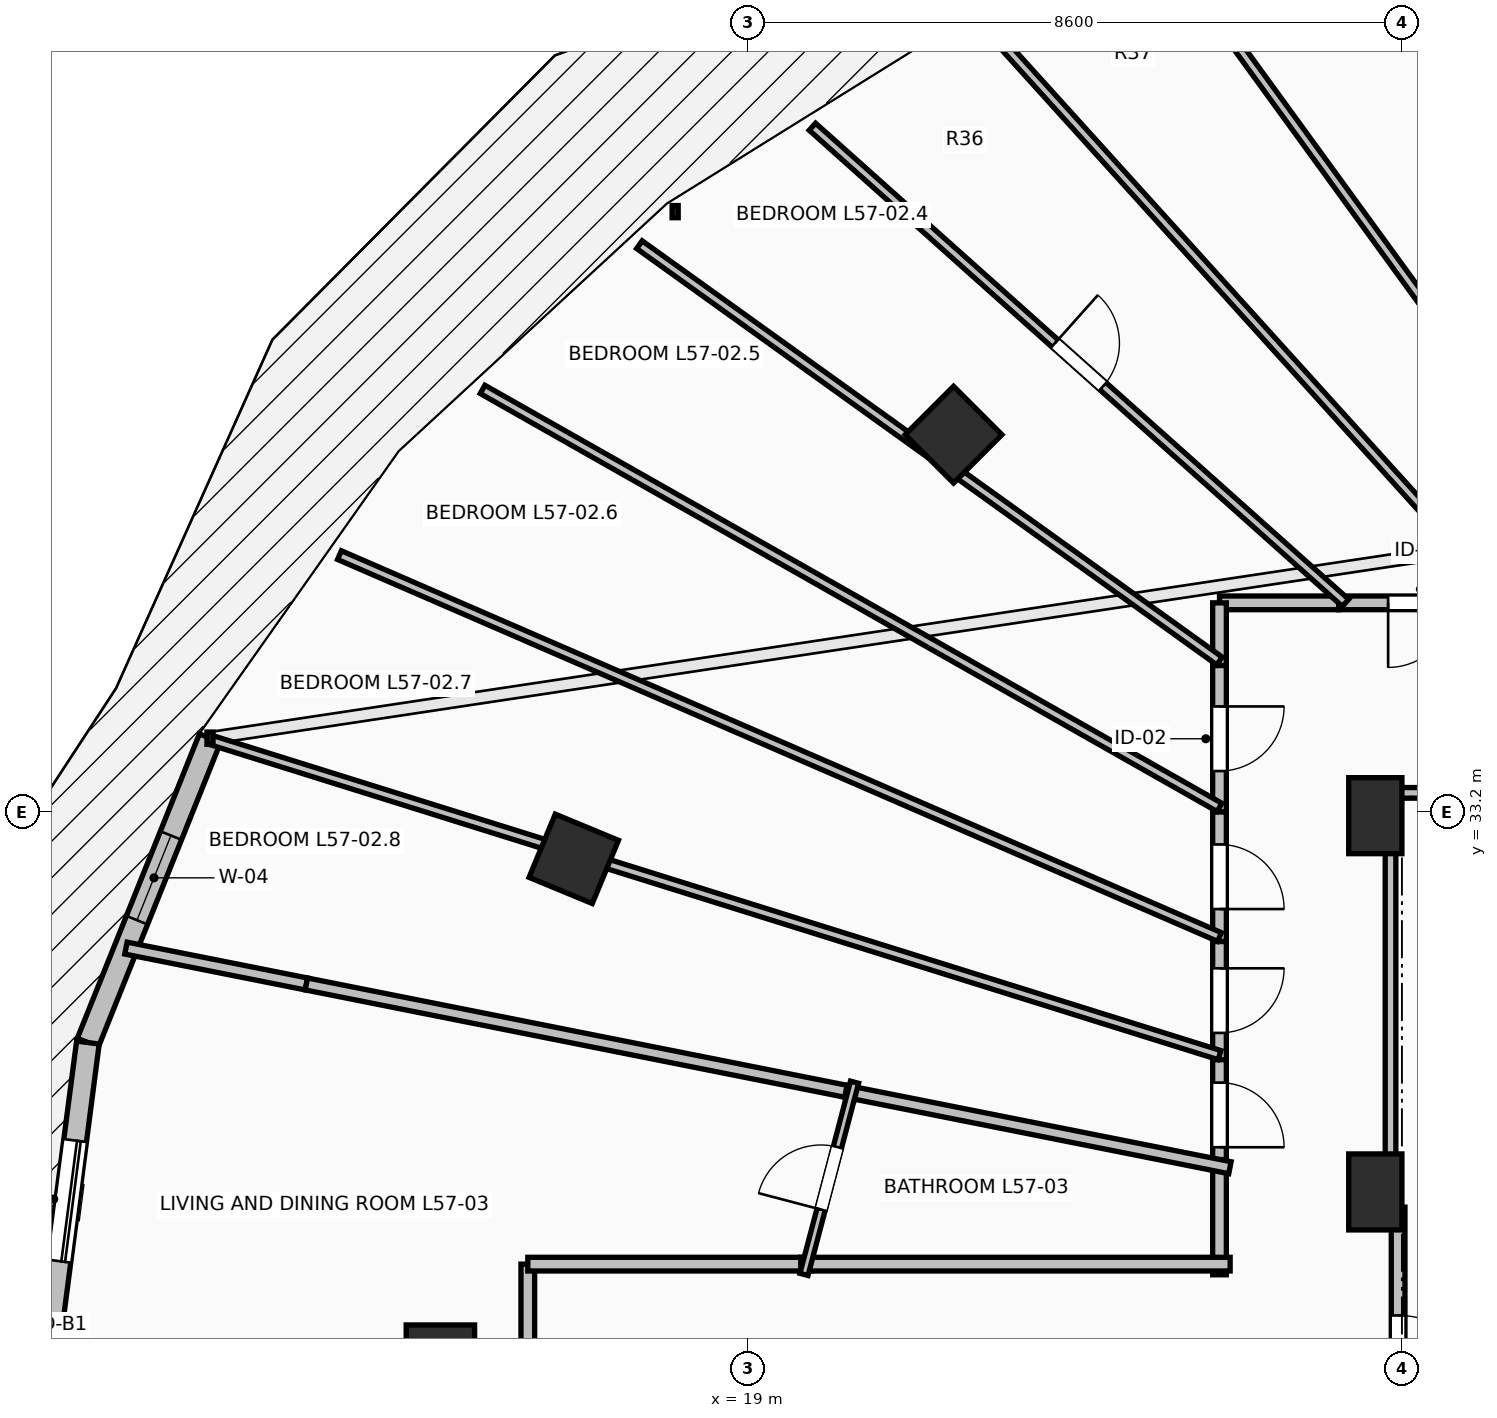
"""IFC4 building model, lengths in metres.
Left out: names, types, materials, properties, quantities, classifications, styles, units other than length and angle.
Written with IfcOpenShell. Run it as: python <this file> out.ifc"""

import sys

from ifc_helpers import new_model, si_unit, direction, frame, frame_2d, origin, origin_2d, place, context, subcontext, project, spatial, rectangle, extrude, element, fill, save


model = new_model("IFC4")
c1 = context("Model", 3, precision=1e-05, world=origin(), true_north=direction((0.0, 1.0)))
c2 = subcontext(c1, "Body", "Model", "MODEL_VIEW")
j1 = project(units=[si_unit("LENGTHUNIT", "METRE"), si_unit("PLANEANGLEUNIT", "RADIAN")], contexts=[c1])
p1 = place(None, origin())
s1 = spatial("IfcSite", under=j1, at=p1, CompositionType="ELEMENT")
p2 = place(p1, origin())
s2 = spatial("IfcBuilding", under=s1, at=p2, CompositionType="ELEMENT")
p3 = place(p2, frame((0.0, 0.0, 210.75)))
s3 = spatial("IfcBuildingStorey", under=s2, at=p3, CompositionType="ELEMENT", Elevation=210.75)
for number, where, z_axis, x_axis in (
    (1, (21.701, 38.162, 0.0), (0.0, 0.0, 1.0), (-0.707, 0.707, 0.0)),
    (2, (16.705, 32.582, 0.0), (0.0, 0.0, 1.0), (-0.924, 0.383, 0.0)),
    (3, (14.95, 26.0, 0.0), (0.0, 0.0, 1.0), (-1.0, 0.0, 0.0)),
):
    element("IfcColumn", number, at=place(p3, frame(where, z_axis=z_axis, x_axis=x_axis)), inside=s3, PredefinedType="COLUMN", context=c2, shape_type="SweptSolid", body=[
        extrude(rectangle(XDim=0.9, YDim=0.9, at=origin_2d()), origin(), (0.0, 0.0, 1.0), 3.55),
    ])
for number, where, z_axis, x_axis in (
    (4, (27.25, 28.2, 0.0), (0.0, 0.0, 1.0), (1.0, 0.0, 0.0)),
    (5, (27.25, 33.15, 0.0), (0.0, 0.0, 1.0), (1.0, 0.0, 0.0)),
):
    element("IfcColumn", number, at=place(p3, frame(where, z_axis=z_axis, x_axis=x_axis)), inside=s3, PredefinedType="PILASTER", context=c2, shape_type="SweptSolid", body=[
        extrude(rectangle(XDim=0.7, YDim=1.0, at=origin_2d()), origin(), (0.0, 0.0, 1.0), 3.55),
    ])
p4 = place(p3, frame((11.919, 34.17, 0.0), z_axis=(0.0, 0.0, 1.0), x_axis=(-0.372268409848, -0.928125116043, 0.0)))
e6 = element("IfcWall", 6, at=p4, inside=s3, PredefinedType="STANDARD", context=c2, shape_type="SweptSolid", body=[
    extrude(rectangle(XDim=4.315, YDim=0.3, at=frame_2d((2.158, 0.0))), origin(), (0.0, 0.0, 1.0), 3.29),
])
p5 = place(p4, frame((1.38, 0.0, 0.85)))
e7 = element("IfcOpeningElement", 7, at=p5, cuts=e6, PredefinedType="OPENING", context=c2, shape_type="SweptSolid", body=[
    extrude(rectangle(XDim=1.2, YDim=1.95, at=frame_2d((0.6, 0.975))), frame((0.0, 0.165, 0.0), z_axis=(0.0, -1.0, 0.0), x_axis=(1.0, 0.0, 0.0)), (0.0, 0.0, 1.0), 0.33),
])
p6 = place(p3, frame((10.312, 30.165, 0.0), z_axis=(0.0, 0.0, 1.0), x_axis=(-0.129147853268, -0.991625348605, 0.0)))
e8 = element("IfcWall", 8, at=p6, inside=s3, PredefinedType="STANDARD", context=c2, shape_type="SweptSolid", body=[
    extrude(rectangle(XDim=4.2, YDim=0.3, at=frame_2d((2.1, 0.0))), origin(), (0.0, 0.0, 1.0), 3.29),
])
p7 = place(p6, frame((1.3, 0.0, 0.0)))
e9 = element("IfcOpeningElement", 9, at=p7, cuts=e8, PredefinedType="OPENING", context=c2, shape_type="SweptSolid", body=[
    extrude(rectangle(XDim=1.6, YDim=2.3, at=frame_2d((0.8, 1.15))), frame((0.0, 0.165, 0.0), z_axis=(0.0, -1.0, 0.0), x_axis=(1.0, 0.0, 0.0)), (0.0, 0.0, 1.0), 0.33),
])
p8 = place(p3, frame((27.55, 28.0, 0.0), z_axis=(0.0, 0.0, 1.0), x_axis=(0.0, -1.0, 0.0)))
e10 = element("IfcWall", 10, at=p8, inside=s3, PredefinedType="PARTITIONING", context=c2, shape_type="SweptSolid", body=[
    extrude(rectangle(XDim=4.05, YDim=0.18, at=frame_2d((2.025, 0.0))), origin(), (0.0, 0.0, 1.0), 3.29),
])
p9 = place(p8, frame((1.425, 0.0, 0.0)))
e11 = element("IfcOpeningElement", 11, at=p9, cuts=e10, PredefinedType="OPENING", context=c2, shape_type="SweptSolid", body=[
    extrude(rectangle(XDim=1.2, YDim=2.15, at=frame_2d((0.6, 1.075))), frame((0.0, 0.105, 0.0), z_axis=(0.0, -1.0, 0.0), x_axis=(1.0, 0.0, 0.0)), (0.0, 0.0, 1.0), 0.21),
])
p10 = place(p3, frame((28.919, 35.95, 0.0), z_axis=(0.0, 0.0, 1.0), x_axis=(-1.0, 0.0, 0.0)))
e12 = element("IfcWall", 12, at=p10, inside=s3, PredefinedType="PARTITIONING", context=c2, shape_type="SweptSolid", body=[
    extrude(rectangle(XDim=2.151, YDim=0.18, at=frame_2d((1.075, 0.0))), origin(), (0.0, 0.0, 1.0), 2.482),
])
p11 = place(p10, frame((0.65, 0.0, 0.0)))
e13 = element("IfcOpeningElement", 13, at=p11, cuts=e12, PredefinedType="OPENING", context=c2, shape_type="SweptSolid", body=[
    extrude(rectangle(XDim=0.85, YDim=2.1, at=frame_2d((0.425, 1.05))), frame((0.0, 0.105, 0.0), z_axis=(0.0, -1.0, 0.0), x_axis=(1.0, 0.0, 0.0)), (0.0, 0.0, 1.0), 0.21),
])
p12 = place(p3, frame((26.768, 35.95, 0.0), z_axis=(0.0, 0.0, 1.0), x_axis=(-1.0, 0.0, 0.0)))
e14 = element("IfcWall", 14, at=p12, inside=s3, PredefinedType="PARTITIONING", context=c2, shape_type="SweptSolid", body=[
    extrude(rectangle(XDim=1.568, YDim=0.18, at=frame_2d((0.784, 0.0))), origin(), (0.0, 0.0, 1.0), 3.29),
])
p13 = place(p3, frame((25.2, 35.95, 0.0), z_axis=(0.0, 0.0, 1.0), x_axis=(0.0, -1.0, 0.0)))
e15 = element("IfcWall", 15, at=p13, inside=s3, PredefinedType="PARTITIONING", context=c2, shape_type="SweptSolid", body=[
    extrude(rectangle(XDim=0.825, YDim=0.18, at=frame_2d((0.413, 0.0))), origin(), (0.0, 0.0, 1.0), 2.482),
])
p14 = place(p3, frame((25.2, 35.125, 0.0), z_axis=(0.0, 0.0, 1.0), x_axis=(0.0, -1.0, 0.0)))
e16 = element("IfcWall", 16, at=p14, inside=s3, PredefinedType="PARTITIONING", context=c2, shape_type="SweptSolid", body=[
    extrude(rectangle(XDim=1.926, YDim=0.18, at=frame_2d((0.963, 0.0))), origin(), (0.0, 0.0, 1.0), 2.482),
])
p15 = place(p14, frame((0.538, 0.0, 0.0)))
e17 = element("IfcOpeningElement", 17, at=p15, cuts=e16, PredefinedType="OPENING", context=c2, shape_type="SweptSolid", body=[
    extrude(rectangle(XDim=0.85, YDim=2.1, at=frame_2d((0.425, 1.05))), frame((0.0, 0.105, 0.0), z_axis=(0.0, -1.0, 0.0), x_axis=(1.0, 0.0, 0.0)), (0.0, 0.0, 1.0), 0.21),
])
p16 = place(p3, frame((25.2, 33.199, 0.0), z_axis=(0.0, 0.0, 1.0), x_axis=(0.0, -1.0, 0.0)))
e18 = element("IfcWall", 18, at=p16, inside=s3, PredefinedType="PARTITIONING", context=c2, shape_type="SweptSolid", body=[
    extrude(rectangle(XDim=1.705, YDim=0.18, at=frame_2d((0.853, 0.0))), origin(), (0.0, 0.0, 1.0), 2.979),
])
p17 = place(p16, frame((0.427, 0.0, 0.0)))
e19 = element("IfcOpeningElement", 19, at=p17, cuts=e18, PredefinedType="OPENING", context=c2, shape_type="SweptSolid", body=[
    extrude(rectangle(XDim=0.85, YDim=2.1, at=frame_2d((0.425, 1.05))), frame((0.0, 0.105, 0.0), z_axis=(0.0, -1.0, 0.0), x_axis=(1.0, 0.0, 0.0)), (0.0, 0.0, 1.0), 0.21),
])
p18 = place(p3, frame((25.2, 31.494, 0.0), z_axis=(0.0, 0.0, 1.0), x_axis=(0.0, -1.0, 0.0)))
e20 = element("IfcWall", 20, at=p18, inside=s3, PredefinedType="PARTITIONING", context=c2, shape_type="SweptSolid", body=[
    extrude(rectangle(XDim=1.554, YDim=0.18, at=frame_2d((0.777, 0.0))), origin(), (0.0, 0.0, 1.0), 3.29),
])
p19 = place(p18, frame((0.352, 0.0, 0.0)))
e21 = element("IfcOpeningElement", 21, at=p19, cuts=e20, PredefinedType="OPENING", context=c2, shape_type="SweptSolid", body=[
    extrude(rectangle(XDim=0.85, YDim=2.1, at=frame_2d((0.425, 1.05))), frame((0.0, 0.105, 0.0), z_axis=(0.0, -1.0, 0.0), x_axis=(1.0, 0.0, 0.0)), (0.0, 0.0, 1.0), 0.21),
])
p20 = place(p3, frame((25.2, 29.94, 0.0), z_axis=(0.0, 0.0, 1.0), x_axis=(0.0, -1.0, 0.0)))
e22 = element("IfcWall", 22, at=p20, inside=s3, PredefinedType="PARTITIONING", context=c2, shape_type="SweptSolid", body=[
    extrude(rectangle(XDim=1.454, YDim=0.18, at=frame_2d((0.727, 0.0))), origin(), (0.0, 0.0, 1.0), 2.482),
])
p21 = place(p20, frame((0.302, 0.0, 0.0)))
e23 = element("IfcOpeningElement", 23, at=p21, cuts=e22, PredefinedType="OPENING", context=c2, shape_type="SweptSolid", body=[
    extrude(rectangle(XDim=0.85, YDim=2.1, at=frame_2d((0.425, 1.05))), frame((0.0, 0.105, 0.0), z_axis=(0.0, -1.0, 0.0), x_axis=(1.0, 0.0, 0.0)), (0.0, 0.0, 1.0), 0.21),
])
p22 = place(p3, frame((16.1, 27.25, 0.0), z_axis=(0.0, 0.0, 1.0), x_axis=(0.0, -1.0, 0.0)))
e24 = element("IfcWall", 24, at=p22, inside=s3, PredefinedType="PARTITIONING", context=c2, shape_type="SweptSolid", body=[
    extrude(rectangle(XDim=2.7, YDim=0.18, at=frame_2d((1.35, 0.0))), origin(), (0.0, 0.0, 1.0), 2.482),
])
p23 = place(p3, frame((19.831, 27.25, 0.0), z_axis=(0.0, 0.0, 1.0), x_axis=(-1.0, 0.0, 0.0)))
e25 = element("IfcWall", 25, at=p23, inside=s3, PredefinedType="PARTITIONING", context=c2, shape_type="SweptSolid", body=[
    extrude(rectangle(XDim=3.731, YDim=0.18, at=frame_2d((1.865, 0.0))), origin(), (0.0, 0.0, 1.0), 2.936),
])
p24 = place(p3, frame((25.2, 28.626, 0.0), z_axis=(0.0, 0.0, 1.0), x_axis=(0.0, -1.0, 0.0)))
e26 = element("IfcWall", 26, at=p24, inside=s3, PredefinedType="PARTITIONING", context=c2, shape_type="SweptSolid", body=[
    extrude(rectangle(XDim=1.516, YDim=0.18, at=frame_2d((0.758, 0.0))), origin(), (0.0, 0.0, 1.0), 2.482),
])
p25 = place(p3, frame((25.34, 27.25, 0.0), z_axis=(0.0, 0.0, 1.0), x_axis=(-1.0, 0.0, 0.0)))
e27 = element("IfcWall", 27, at=p25, inside=s3, PredefinedType="PARTITIONING", context=c2, shape_type="SweptSolid", body=[
    extrude(rectangle(XDim=5.649, YDim=0.18, at=frame_2d((2.825, 0.0))), origin(), (0.0, 0.0, 1.0), 2.482),
])
p26 = place(p3, frame((27.562, 44.133, 0.0), z_axis=(0.0, 0.0, 1.0), x_axis=(0.498920898859, -0.866647527361, 0.0)))
e28 = element("IfcWall", 28, at=p26, inside=s3, PredefinedType="PARTITIONING", context=c2, shape_type="SweptSolid", body=[
    extrude(rectangle(XDim=9.442, YDim=0.125, at=frame_2d((4.721, 0.0))), origin(), (0.0, 0.0, 1.0), 2.482),
])
p27 = place(p26, frame((4.271, 0.0, 0.0)))
e29 = element("IfcOpeningElement", 29, at=p27, cuts=e28, PredefinedType="OPENING", context=c2, shape_type="SweptSolid", body=[
    extrude(rectangle(XDim=0.9, YDim=2.1, at=frame_2d((0.45, 1.05))), frame((0.0, 0.077, 0.0), z_axis=(0.0, -1.0, 0.0), x_axis=(1.0, 0.0, 0.0)), (0.0, 0.0, 1.0), 0.155),
])
p28 = place(p3, frame((24.46, 44.617, 0.0), z_axis=(0.0, 0.0, 1.0), x_axis=(0.588154087929, -0.808748891098, 0.0)))
e30 = element("IfcWall", 30, at=p28, inside=s3, PredefinedType="PARTITIONING", context=c2, shape_type="SweptSolid", body=[
    extrude(rectangle(XDim=10.717, YDim=0.125, at=frame_2d((5.358, 0.0))), origin(), (0.0, 0.0, 1.0), 2.482),
])
p29 = place(p3, frame((22.077, 43.603, 0.0), z_axis=(0.0, 0.0, 1.0), x_axis=(0.670853853748, -0.741589581177, 0.0)))
e31 = element("IfcWall", 31, at=p29, inside=s3, PredefinedType="PARTITIONING", context=c2, shape_type="SweptSolid", body=[
    extrude(rectangle(XDim=10.32, YDim=0.125, at=frame_2d((5.16, 0.0))), origin(), (0.0, 0.0, 1.0), 2.482),
])
p30 = place(p3, frame((19.844, 42.214, 0.0), z_axis=(0.0, 0.0, 1.0), x_axis=(0.745845988041, -0.666118429502, 0.0)))
e32 = element("IfcWall", 32, at=p30, inside=s3, PredefinedType="PARTITIONING", context=c2, shape_type="SweptSolid", body=[
    extrude(rectangle(XDim=9.404, YDim=0.125, at=frame_2d((4.702, 0.0))), origin(), (0.0, 0.0, 1.0), 2.824),
])
p31 = place(p30, frame((4.277, 0.0, 0.0)))
e33 = element("IfcOpeningElement", 33, at=p31, cuts=e32, PredefinedType="OPENING", context=c2, shape_type="SweptSolid", body=[
    extrude(rectangle(XDim=0.85, YDim=2.1, at=frame_2d((0.425, 1.05))), frame((0.0, 0.077, 0.0), z_axis=(0.0, -1.0, 0.0), x_axis=(1.0, 0.0, 0.0)), (0.0, 0.0, 1.0), 0.155),
])
p32 = place(p3, frame((17.568, 40.662, 0.0), z_axis=(0.0, 0.0, 1.0), x_axis=(0.812435479674, -0.583051105279, 0.0)))
e34 = element("IfcWall", 34, at=p32, inside=s3, PredefinedType="PARTITIONING", context=c2, shape_type="SweptSolid", body=[
    extrude(rectangle(XDim=9.394, YDim=0.125, at=frame_2d((4.697, 0.0))), origin(), (0.0, 0.0, 1.0), 2.482),
])
p33 = place(p3, frame((15.505, 38.758, 0.0), z_axis=(0.0, 0.0, 1.0), x_axis=(0.86982387552, -0.49336236741, 0.0)))
e35 = element("IfcWall", 35, at=p33, inside=s3, PredefinedType="PARTITIONING", context=c2, shape_type="SweptSolid", body=[
    extrude(rectangle(XDim=11.146, YDim=0.125, at=frame_2d((5.573, 0.0))), origin(), (0.0, 0.0, 1.0), 2.824),
])
p34 = place(p3, frame((13.622, 36.578, 0.0), z_axis=(0.0, 0.0, 1.0), x_axis=(0.917357672996, -0.398063939331, 0.0)))
e36 = element("IfcWall", 36, at=p34, inside=s3, PredefinedType="PARTITIONING", context=c2, shape_type="SweptSolid", body=[
    extrude(rectangle(XDim=12.621, YDim=0.125, at=frame_2d((6.311, 0.0))), origin(), (0.0, 0.0, 1.0), 2.824),
])
p35 = place(p3, frame((11.911, 34.152, 0.0), z_axis=(0.0, 0.0, 1.0), x_axis=(0.954494953812, -0.298227066422, 0.0)))
e37 = element("IfcWall", 37, at=p35, inside=s3, PredefinedType="PARTITIONING", context=c2, shape_type="SweptSolid", body=[
    extrude(rectangle(XDim=13.923, YDim=0.125, at=frame_2d((6.961, 0.0))), origin(), (0.0, 0.0, 1.0), 2.482),
])
p36 = place(p3, frame((10.813, 31.408, 0.0), z_axis=(0.0, 0.0, 1.0), x_axis=(0.980808893275, -0.194971574527, 0.0)))
e38 = element("IfcWall", 38, at=p36, inside=s3, PredefinedType="PARTITIONING", context=c2, shape_type="SweptSolid", body=[
    extrude(rectangle(XDim=2.42, YDim=0.16, at=frame_2d((1.21, 0.0))), origin(), (0.0, 0.0, 1.0), 3.29),
])
p37 = place(p3, frame((13.187, 30.936, 0.0), z_axis=(0.0, 0.0, 1.0), x_axis=(0.980790143568, -0.195065871645, 0.0)))
e39 = element("IfcWall", 39, at=p37, inside=s3, PredefinedType="PARTITIONING", context=c2, shape_type="SweptSolid", body=[
    extrude(rectangle(XDim=7.377, YDim=0.16, at=frame_2d((3.688, 0.0))), origin(), (0.0, 0.0, 1.0), 2.824),
])
p38 = place(p3, frame((20.285, 29.524, 0.0), z_axis=(0.0, 0.0, 1.0), x_axis=(0.980782472544, -0.195104437547, 0.0)))
e40 = element("IfcWall", 40, at=p38, inside=s3, PredefinedType="PARTITIONING", context=c2, shape_type="SweptSolid", body=[
    extrude(rectangle(XDim=5.152, YDim=0.16, at=frame_2d((2.576, 0.0))), origin(), (0.0, 0.0, 1.0), 2.936),
])
p39 = place(p3, frame((19.733, 27.115, 0.0), z_axis=(0.0, 0.0, 1.0), x_axis=(0.254424362052, 0.967092676011, 0.0)))
e41 = element("IfcWall", 41, at=p39, inside=s3, PredefinedType="PARTITIONING", context=c2, shape_type="SweptSolid", body=[
    extrude(rectangle(XDim=2.615, YDim=0.11, at=frame_2d((1.307, 0.0))), origin(), (0.0, 0.0, 1.0), 2.482),
])
p40 = place(p39, frame((0.882, 0.0, 0.0)))
e42 = element("IfcOpeningElement", 42, at=p40, cuts=e41, PredefinedType="OPENING", context=c2, shape_type="SweptSolid", body=[
    extrude(rectangle(XDim=0.85, YDim=2.1, at=frame_2d((0.425, 1.05))), frame((0.0, 0.07, 0.0), z_axis=(0.0, -1.0, 0.0), x_axis=(1.0, 0.0, 0.0)), (0.0, 0.0, 1.0), 0.14),
])
p41 = place(p3, frame((28.894, 33.45, 0.0), z_axis=(0.0, 0.0, 1.0), x_axis=(-1.0, 0.0, 0.0)))
e43 = element("IfcWall", 43, at=p41, inside=s3, PredefinedType="PARTITIONING", context=c2, shape_type="SweptSolid", body=[
    extrude(rectangle(XDim=1.444, YDim=0.14, at=frame_2d((0.722, 0.0))), origin(), (0.0, 0.0, 1.0), 2.482),
])
p42 = place(p3, frame((27.45, 33.45, 0.0), z_axis=(0.0, 0.0, 1.0), x_axis=(0.0, -1.0, 0.0)))
e44 = element("IfcWall", 44, at=p42, inside=s3, PredefinedType="PARTITIONING", context=c2, shape_type="SweptSolid", body=[
    extrude(rectangle(XDim=5.254, YDim=0.14, at=frame_2d((2.627, 0.0))), origin(), (0.0, 0.0, 1.0), 2.482),
])
p43 = place(p7, origin())
e45 = element("IfcDoor", 45, at=p43, inside=s3, OperationType="SLIDING_TO_LEFT", PredefinedType="DOOR", context=c2, shape_type="SweptSolid", body=[
    extrude(rectangle(XDim=1.6, YDim=2.3, at=frame_2d((0.8, 1.15))), frame((0.0, 0.025, 0.0), z_axis=(0.0, -1.0, 0.0), x_axis=(1.0, 0.0, 0.0)), (0.0, 0.0, 1.0), 0.05),
])
fill(e9, e45)
p44 = place(p5, origin())
e46 = element("IfcWindow", 46, at=p44, inside=s3, PartitioningType="SINGLE_PANEL", PredefinedType="WINDOW", context=c2, shape_type="SweptSolid", body=[
    extrude(rectangle(XDim=1.2, YDim=1.95, at=frame_2d((0.6, 0.975))), frame((0.0, 0.03, 0.0), z_axis=(0.0, -1.0, 0.0), x_axis=(1.0, 0.0, 0.0)), (0.0, 0.0, 1.0), 0.06),
])
fill(e7, e46)
p45 = place(p9, origin())
e47 = element("IfcDoor", 47, at=p45, inside=s3, OperationType="SINGLE_SWING_RIGHT", PredefinedType="DOOR", context=c2, shape_type="SweptSolid", body=[
    extrude(rectangle(XDim=1.2, YDim=2.15, at=frame_2d((0.6, 1.075))), frame((0.0, 0.025, 0.0), z_axis=(0.0, -1.0, 0.0), x_axis=(1.0, 0.0, 0.0)), (0.0, 0.0, 1.0), 0.05),
])
fill(e11, e47)
p46 = place(p40, origin())
e48 = element("IfcDoor", 48, at=p46, inside=s3, OperationType="SINGLE_SWING_LEFT", PredefinedType="DOOR", context=c2, shape_type="SweptSolid", body=[
    extrude(rectangle(XDim=0.85, YDim=2.1, at=frame_2d((0.425, 1.05))), frame((0.0, 0.025, 0.0), z_axis=(0.0, -1.0, 0.0), x_axis=(1.0, 0.0, 0.0)), (0.0, 0.0, 1.0), 0.05),
])
fill(e42, e48)
p47 = place(p11, origin())
e49 = element("IfcDoor", 49, at=p47, inside=s3, OperationType="SINGLE_SWING_RIGHT", PredefinedType="DOOR", context=c2, shape_type="SweptSolid", body=[
    extrude(rectangle(XDim=0.85, YDim=2.1, at=frame_2d((0.425, 1.05))), frame((0.0, 0.025, 0.0), z_axis=(0.0, -1.0, 0.0), x_axis=(1.0, 0.0, 0.0)), (0.0, 0.0, 1.0), 0.05),
])
fill(e13, e49)
p48 = place(p15, origin())
e50 = element("IfcDoor", 50, at=p48, inside=s3, OperationType="SINGLE_SWING_LEFT", PredefinedType="DOOR", context=c2, shape_type="SweptSolid", body=[
    extrude(rectangle(XDim=0.85, YDim=2.1, at=frame_2d((0.425, 1.05))), frame((0.0, 0.025, 0.0), z_axis=(0.0, -1.0, 0.0), x_axis=(1.0, 0.0, 0.0)), (0.0, 0.0, 1.0), 0.05),
])
fill(e17, e50)
p49 = place(p17, origin())
e51 = element("IfcDoor", 51, at=p49, inside=s3, OperationType="SINGLE_SWING_RIGHT", PredefinedType="DOOR", context=c2, shape_type="SweptSolid", body=[
    extrude(rectangle(XDim=0.85, YDim=2.1, at=frame_2d((0.425, 1.05))), frame((0.0, 0.025, 0.0), z_axis=(0.0, -1.0, 0.0), x_axis=(1.0, 0.0, 0.0)), (0.0, 0.0, 1.0), 0.05),
])
fill(e19, e51)
p50 = place(p19, origin())
e52 = element("IfcDoor", 52, at=p50, inside=s3, OperationType="SINGLE_SWING_LEFT", PredefinedType="DOOR", context=c2, shape_type="SweptSolid", body=[
    extrude(rectangle(XDim=0.85, YDim=2.1, at=frame_2d((0.425, 1.05))), frame((0.0, 0.025, 0.0), z_axis=(0.0, -1.0, 0.0), x_axis=(1.0, 0.0, 0.0)), (0.0, 0.0, 1.0), 0.05),
])
fill(e21, e52)
p51 = place(p21, origin())
e53 = element("IfcDoor", 53, at=p51, inside=s3, OperationType="SINGLE_SWING_RIGHT", PredefinedType="DOOR", context=c2, shape_type="SweptSolid", body=[
    extrude(rectangle(XDim=0.85, YDim=2.1, at=frame_2d((0.425, 1.05))), frame((0.0, 0.025, 0.0), z_axis=(0.0, -1.0, 0.0), x_axis=(1.0, 0.0, 0.0)), (0.0, 0.0, 1.0), 0.05),
])
fill(e23, e53)
p52 = place(p31, origin())
e54 = element("IfcDoor", 54, at=p52, inside=s3, OperationType="SINGLE_SWING_LEFT", PredefinedType="DOOR", context=c2, shape_type="SweptSolid", body=[
    extrude(rectangle(XDim=0.85, YDim=2.1, at=frame_2d((0.425, 1.05))), frame((0.0, 0.025, 0.0), z_axis=(0.0, -1.0, 0.0), x_axis=(1.0, 0.0, 0.0)), (0.0, 0.0, 1.0), 0.05),
])
fill(e33, e54)
save(model, sys.argv[1])
